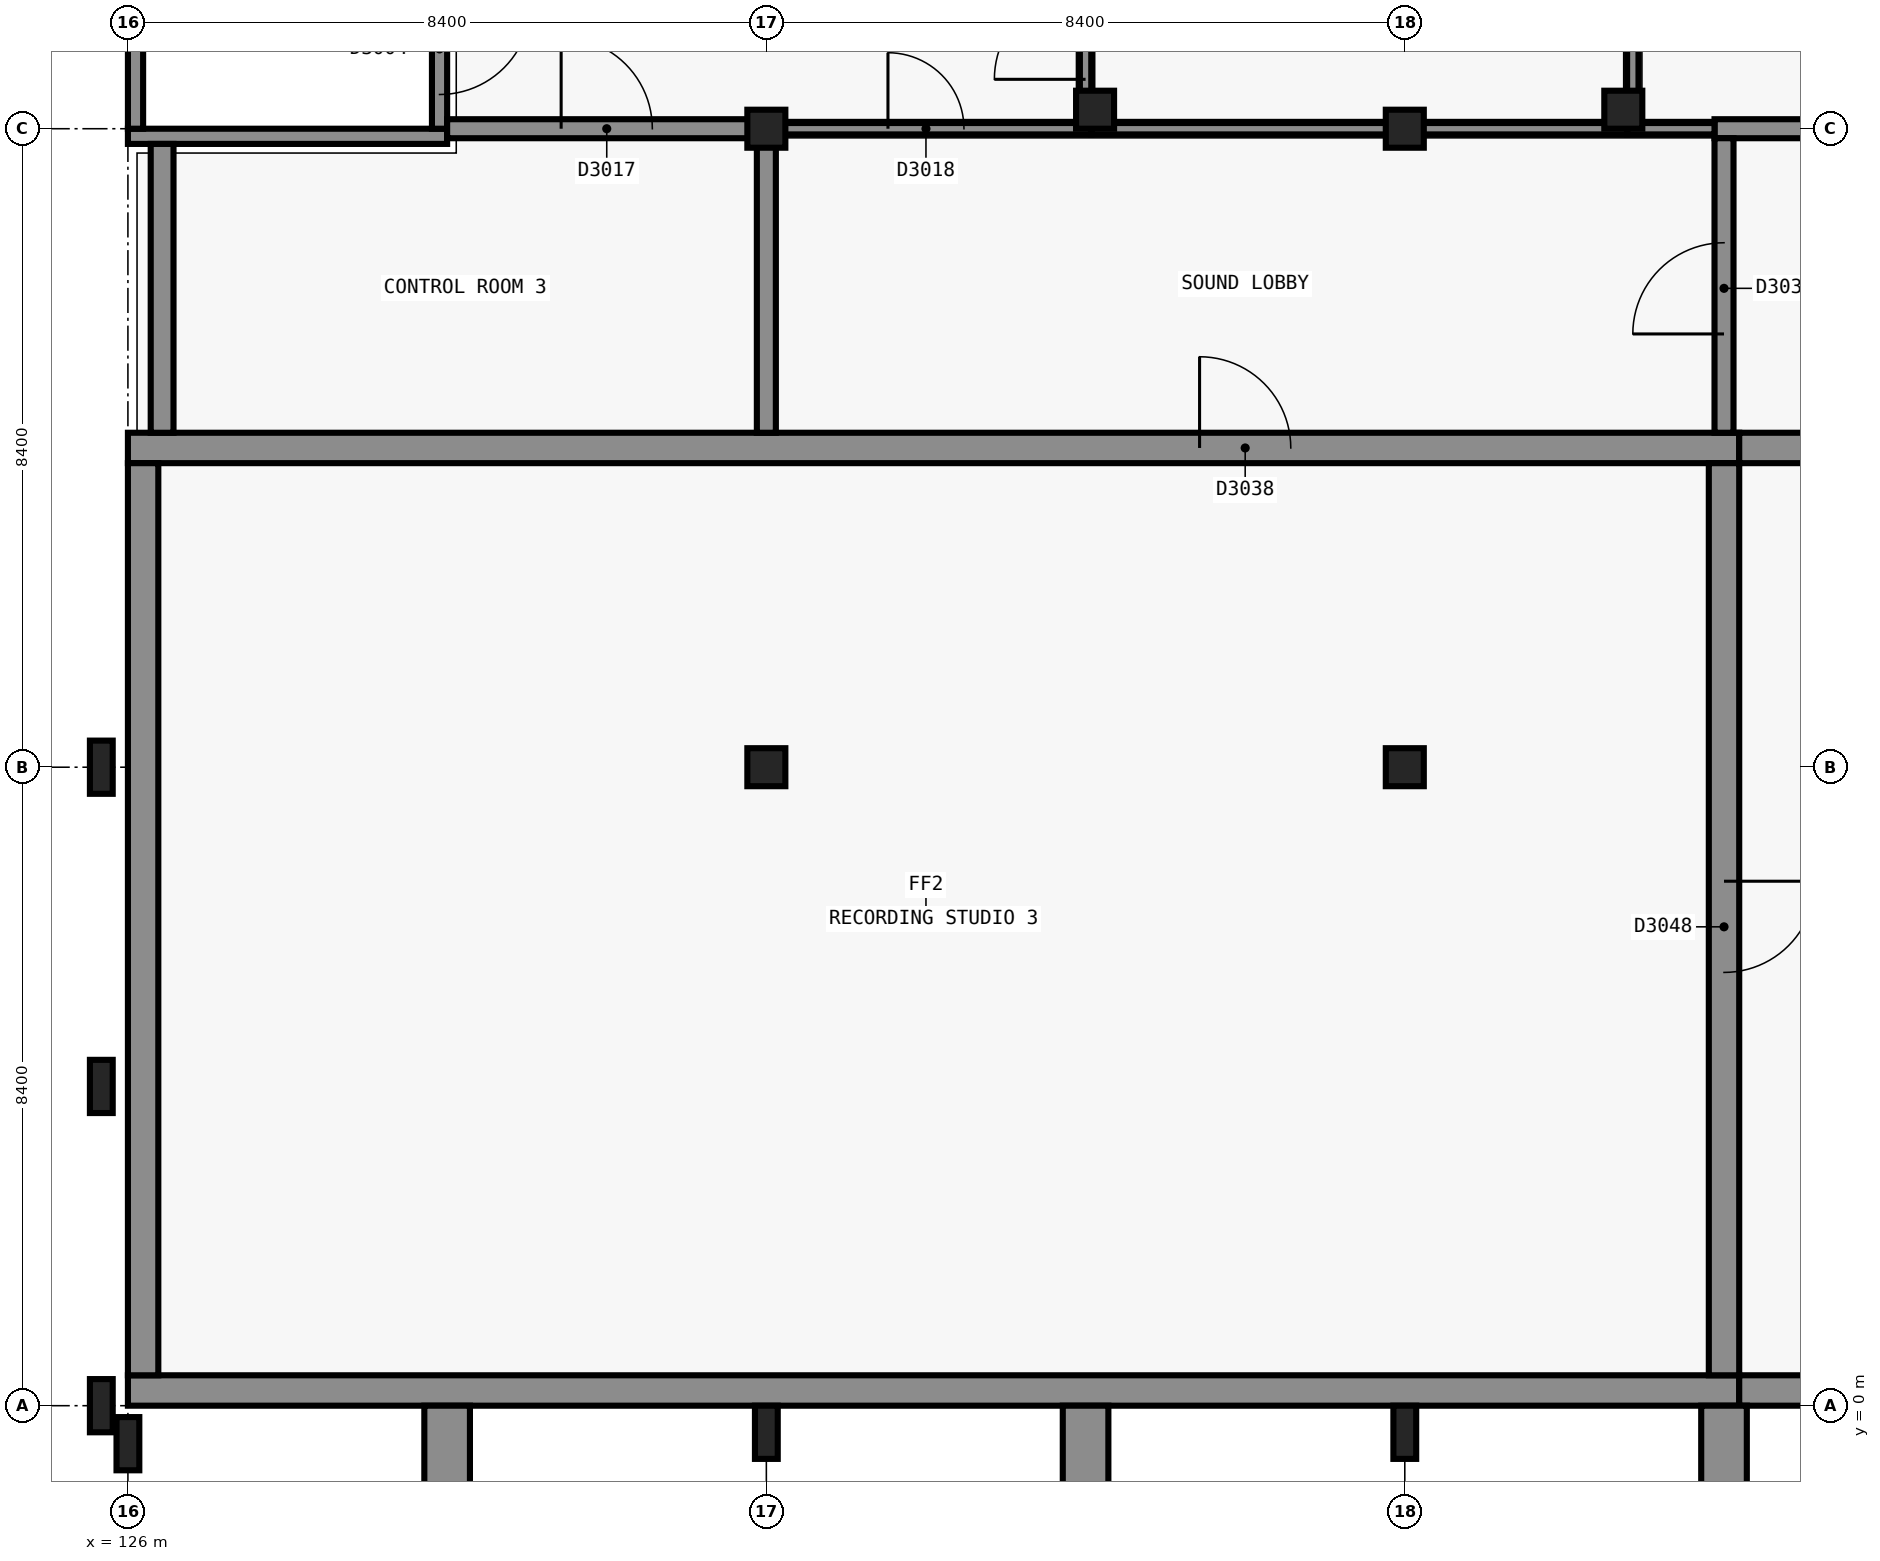
"""IFC4 building model, lengths in metres.
Left out: names, types, materials, properties, quantities, classifications, styles, units other than length and angle.
Written with IfcOpenShell. Run it as: python <this file> out.ifc"""

import sys

from ifc_helpers import new_model, si_unit, direction, frame, frame_2d, origin, origin_2d, place, context, subcontext, project, spatial, rectangle, extrude, element, fill, save


model = new_model("IFC4")
c1 = context("Model", 3, precision=1e-05, world=origin(), true_north=direction((0.0, 1.0)))
c2 = subcontext(c1, "Body", "Model", "MODEL_VIEW")
j1 = project(units=[si_unit("LENGTHUNIT", "METRE"), si_unit("PLANEANGLEUNIT", "RADIAN")], contexts=[c1])
p1 = place(None, origin())
s1 = spatial("IfcSite", under=j1, at=p1, CompositionType="ELEMENT")
p2 = place(p1, origin())
s2 = spatial("IfcBuilding", under=s1, at=p2, CompositionType="ELEMENT")
p3 = place(p2, frame((0.0, 0.0, 15.0)))
s3 = spatial("IfcBuildingStorey", under=s2, at=p3, CompositionType="ELEMENT", Elevation=15.0)
p4 = place(p3, frame((130.2, 16.7, 0.0), z_axis=(0.0, 0.0, 1.0), x_axis=(-1.0, 0.0, 0.0)))
e1 = element("IfcWall", 1, at=p4, inside=s3, PredefinedType="SHEAR", context=c2, shape_type="SweptSolid", body=[
    extrude(rectangle(XDim=4.2, YDim=0.2, at=frame_2d((2.1, 0.0))), origin(), (0.0, 0.0, 1.0), 4.8),
])
p5 = place(p3, frame((126.1, 16.8, 0.0), z_axis=(0.0, 0.0, 1.0), x_axis=(0.0, 1.0, 0.0)))
e2 = element("IfcWall", 2, at=p5, inside=s3, PredefinedType="SHEAR", context=c2, shape_type="SweptSolid", body=[
    extrude(rectangle(XDim=8.2, YDim=0.2, at=frame_2d((4.1, 0.0))), origin(), (0.0, 0.0, 1.0), 4.8),
])
p6 = place(p3, frame((130.1, 25.0, 0.0), z_axis=(0.0, 0.0, 1.0), x_axis=(0.0, -1.0, 0.0)))
e3 = element("IfcWall", 3, at=p6, inside=s3, PredefinedType="SHEAR", context=c2, shape_type="SweptSolid", body=[
    extrude(rectangle(XDim=8.2, YDim=0.2, at=frame_2d((4.1, 0.0))), origin(), (0.0, 0.0, 1.0), 4.8),
])
p7 = place(p6, frame((6.55, 0.0, 0.0)))
e4 = element("IfcOpeningElement", 4, at=p7, cuts=e3, PredefinedType="OPENING", context=c2, shape_type="SweptSolid", body=[
    extrude(rectangle(XDim=1.2, YDim=2.1, at=frame_2d((0.6, 1.05))), frame((0.0, 0.11, 0.0), z_axis=(0.0, -1.0, 0.0), x_axis=(1.0, 0.0, 0.0)), (0.0, 0.0, 1.0), 0.22),
])
p8 = place(p3, frame((147.2, 0.2, 0.0), z_axis=(0.0, 0.0, 1.0), x_axis=(-1.0, 0.0, 0.0)))
e5 = element("IfcWall", 5, at=p8, inside=s3, PredefinedType="SHEAR", context=c2, shape_type="SweptSolid", body=[
    extrude(rectangle(XDim=21.2, YDim=0.4, at=frame_2d((10.6, 0.0))), origin(), (0.0, 0.0, 1.0), 4.8),
])
p9 = place(p3, frame((126.0, 12.6, 0.0), z_axis=(0.0, 0.0, 1.0), x_axis=(1.0, 0.0, 0.0)))
e6 = element("IfcWall", 6, at=p9, inside=s3, PredefinedType="SHEAR", context=c2, shape_type="SweptSolid", body=[
    extrude(rectangle(XDim=21.2, YDim=0.4, at=frame_2d((10.6, 0.0))), origin(), (0.0, 0.0, 1.0), 4.8),
])
p10 = place(p9, frame((14.1, 0.0, 0.0)))
e7 = element("IfcOpeningElement", 7, at=p10, cuts=e6, PredefinedType="OPENING", context=c2, shape_type="SweptSolid", body=[
    extrude(rectangle(XDim=1.2, YDim=2.1, at=frame_2d((0.6, 1.05))), frame((0.0, 0.21, 0.0), z_axis=(0.0, -1.0, 0.0), x_axis=(1.0, 0.0, 0.0)), (0.0, 0.0, 1.0), 0.42),
])
p11 = place(p3, frame((126.2, 0.4, 0.0), z_axis=(0.0, 0.0, 1.0), x_axis=(0.0, 1.0, 0.0)))
e8 = element("IfcWall", 8, at=p11, inside=s3, PredefinedType="SHEAR", context=c2, shape_type="SweptSolid", body=[
    extrude(rectangle(XDim=12.0, YDim=0.4, at=frame_2d((6.0, 0.0))), origin(), (0.0, 0.0, 1.0), 4.8),
])
p12 = place(p3, frame((147.0, 12.4, 0.0), z_axis=(0.0, 0.0, 1.0), x_axis=(0.0, -1.0, 0.0)))
e9 = element("IfcWall", 9, at=p12, inside=s3, PredefinedType="SHEAR", context=c2, shape_type="SweptSolid", body=[
    extrude(rectangle(XDim=12.0, YDim=0.4, at=frame_2d((6.0, 0.0))), origin(), (0.0, 0.0, 1.0), 4.8),
])
p13 = place(p12, frame((5.5, 0.0, 0.0)))
e10 = element("IfcOpeningElement", 10, at=p13, cuts=e9, PredefinedType="OPENING", context=c2, shape_type="SweptSolid", body=[
    extrude(rectangle(XDim=1.2, YDim=2.1, at=frame_2d((0.6, 1.05))), frame((0.0, 0.21, 0.0), z_axis=(0.0, -1.0, 0.0), x_axis=(1.0, 0.0, 0.0)), (0.0, 0.0, 1.0), 0.42),
])
for number, where, z_axis, x_axis in (
    (11, (168.0, 0.2, 0.0), (0.0, 0.0, 1.0), (-1.0, 0.0, 0.0)),
    (12, (147.2, 12.6, 0.0), (0.0, 0.0, 1.0), (1.0, 0.0, 0.0)),
):
    element("IfcWall", number, at=place(p3, frame(where, z_axis=z_axis, x_axis=x_axis)), inside=s3, PredefinedType="SHEAR", context=c2, shape_type="SweptSolid", body=[
        extrude(rectangle(XDim=20.8, YDim=0.4, at=frame_2d((10.4, 0.0))), origin(), (0.0, 0.0, 1.0), 4.8),
    ])
for number, where, z_axis, x_axis in (
    (13, (134.4, 8.4, 0.0), (0.0, 0.0, 1.0), (1.0, 0.0, 0.0)),
    (14, (134.4, 16.8, 0.0), (0.0, 0.0, 1.0), (1.0, 0.0, 0.0)),
    (15, (142.8, 8.4, 0.0), (0.0, 0.0, 1.0), (1.0, 0.0, 0.0)),
    (16, (142.8, 16.8, 0.0), (0.0, 0.0, 1.0), (1.0, 0.0, 0.0)),
    (17, (138.725, 17.05, 0.0), (0.0, 0.0, 1.0), (1.0, 0.0, 0.0)),
    (18, (145.675, 17.05, 0.0), (0.0, 0.0, 1.0), (1.0, 0.0, 0.0)),
):
    element("IfcColumn", number, at=place(p3, frame(where, z_axis=z_axis, x_axis=x_axis)), inside=s3, PredefinedType="COLUMN", context=c2, shape_type="SweptSolid", body=[
        extrude(rectangle(XDim=0.5, YDim=0.5, at=origin_2d()), origin(), (0.0, 0.0, 1.0), 4.8),
    ])
for number, where, z_axis, x_axis in (
    (19, (126.0, -0.5, 0.0), (0.0, 0.0, 1.0), (1.0, 0.0, 0.0)),
    (20, (134.4, -0.35, 0.0), (0.0, 0.0, 1.0), (1.0, 0.0, 0.0)),
    (21, (142.8, -0.35, 0.0), (0.0, 0.0, 1.0), (1.0, 0.0, 0.0)),
):
    element("IfcColumn", number, at=place(p3, frame(where, z_axis=z_axis, x_axis=x_axis)), inside=s3, PredefinedType="PILASTER", context=c2, shape_type="SweptSolid", body=[
        extrude(rectangle(XDim=0.3, YDim=0.7, at=origin_2d()), origin(), (0.0, 0.0, 1.0), 4.8),
    ])
p14 = place(p3, frame((126.45, 12.8, 0.0), z_axis=(0.0, 0.0, 1.0), x_axis=(0.0, 1.0, 0.0)))
e22 = element("IfcWall", 22, at=p14, inside=s3, PredefinedType="SOLIDWALL", context=c2, shape_type="SweptSolid", body=[
    extrude(rectangle(XDim=3.8, YDim=0.3, at=frame_2d((1.9, 0.0))), origin(), (0.0, 0.0, 1.0), 4.5),
])
for number, where, z_axis, x_axis in (
    (23, (125.65, 0.0, 0.0), (0.0, 0.0, 1.0), (0.0, 1.0, 0.0)),
    (24, (125.65, 4.2, 0.0), (0.0, 0.0, 1.0), (0.0, 1.0, 0.0)),
    (25, (125.65, 8.4, 0.0), (0.0, 0.0, 1.0), (0.0, 1.0, 0.0)),
):
    element("IfcColumn", number, at=place(p3, frame(where, z_axis=z_axis, x_axis=x_axis)), inside=s3, PredefinedType="PILASTER", context=c2, shape_type="SweptSolid", body=[
        extrude(rectangle(XDim=0.3, YDim=0.7, at=origin_2d()), origin(), (0.0, 0.0, 1.0), 4.8),
    ])
for number, where, z_axis, x_axis in (
    (26, (130.2, 0.0, 0.0), (0.0, 0.0, 1.0), (0.0, -1.0, 0.0)),
    (27, (138.6, 0.0, 0.0), (0.0, 0.0, 1.0), (0.0, -1.0, 0.0)),
    (28, (147.0, 0.0, 0.0), (0.0, 0.0, 1.0), (0.0, -1.0, 0.0)),
):
    element("IfcWall", number, at=place(p3, frame(where, z_axis=z_axis, x_axis=x_axis)), inside=s3, PredefinedType="SOLIDWALL", context=c2, shape_type="SweptSolid", body=[
        extrude(rectangle(XDim=1.5, YDim=0.6, at=frame_2d((0.75, 0.0))), origin(), (0.0, 0.0, 1.0), 4.8),
    ])
p15 = place(p3, frame((130.2, 16.8, 0.0), z_axis=(0.0, 0.0, 1.0), x_axis=(1.0, 0.0, 0.0)))
e29 = element("IfcWall", 29, at=p15, inside=s3, PredefinedType="PARTITIONING", context=c2, shape_type="SweptSolid", body=[
    extrude(rectangle(XDim=4.325, YDim=0.25, at=frame_2d((2.163, 0.0))), origin(), (0.0, 0.0, 1.0), 3.7),
])
p16 = place(p15, frame((1.5, 0.0, 0.0)))
e30 = element("IfcOpeningElement", 30, at=p16, cuts=e29, PredefinedType="OPENING", context=c2, shape_type="SweptSolid", body=[
    extrude(rectangle(XDim=1.2, YDim=2.1, at=frame_2d((0.6, 1.05))), frame((0.0, 0.135, 0.0), z_axis=(0.0, -1.0, 0.0), x_axis=(1.0, 0.0, 0.0)), (0.0, 0.0, 1.0), 0.27),
])
p17 = place(p3, frame((146.875, 16.8, 0.0), z_axis=(0.0, 0.0, 1.0), x_axis=(1.0, 0.0, 0.0)))
e31 = element("IfcWall", 31, at=p17, inside=s3, PredefinedType="PARTITIONING", context=c2, shape_type="SweptSolid", body=[
    extrude(rectangle(XDim=16.925, YDim=0.25, at=frame_2d((8.462, 0.0))), origin(), (0.0, 0.0, 1.0), 3.7),
])
p18 = place(p3, frame((134.4, 12.8, 0.0), z_axis=(0.0, 0.0, 1.0), x_axis=(0.0, 1.0, 0.0)))
e32 = element("IfcWall", 32, at=p18, inside=s3, PredefinedType="PARTITIONING", context=c2, shape_type="SweptSolid", body=[
    extrude(rectangle(XDim=3.875, YDim=0.25, at=frame_2d((1.938, 0.0))), origin(), (0.0, 0.0, 1.0), 3.7),
])
p19 = place(p3, frame((147.0, 12.8, 0.0), z_axis=(0.0, 0.0, 1.0), x_axis=(0.0, 1.0, 0.0)))
e33 = element("IfcWall", 33, at=p19, inside=s3, PredefinedType="PARTITIONING", context=c2, shape_type="SweptSolid", body=[
    extrude(rectangle(XDim=3.875, YDim=0.25, at=frame_2d((1.938, 0.0))), origin(), (0.0, 0.0, 1.0), 3.7),
])
p20 = place(p19, frame((1.3, 0.0, 0.0)))
e34 = element("IfcOpeningElement", 34, at=p20, cuts=e33, PredefinedType="OPENING", context=c2, shape_type="SweptSolid", body=[
    extrude(rectangle(XDim=1.2, YDim=2.1, at=frame_2d((0.6, 1.05))), frame((0.0, 0.135, 0.0), z_axis=(0.0, -1.0, 0.0), x_axis=(1.0, 0.0, 0.0)), (0.0, 0.0, 1.0), 0.27),
])
p21 = place(p3, frame((134.525, 16.8, 0.0), z_axis=(0.0, 0.0, 1.0), x_axis=(1.0, 0.0, 0.0)))
e35 = element("IfcWall", 35, at=p21, inside=s3, PredefinedType="PARTITIONING", context=c2, shape_type="SweptSolid", body=[
    extrude(rectangle(XDim=4.15, YDim=0.15, at=frame_2d((2.075, 0.0))), origin(), (0.0, 0.0, 1.0), 3.7),
])
p22 = place(p21, frame((1.475, 0.0, 0.0)))
e36 = element("IfcOpeningElement", 36, at=p22, cuts=e35, PredefinedType="OPENING", context=c2, shape_type="SweptSolid", body=[
    extrude(rectangle(XDim=1.0, YDim=2.1, at=frame_2d((0.5, 1.05))), frame((0.0, 0.085, 0.0), z_axis=(0.0, -1.0, 0.0), x_axis=(1.0, 0.0, 0.0)), (0.0, 0.0, 1.0), 0.17),
])
p23 = place(p3, frame((145.725, 16.8, 0.0), z_axis=(0.0, 0.0, 1.0), x_axis=(1.0, 0.0, 0.0)))
e37 = element("IfcWall", 37, at=p23, inside=s3, PredefinedType="PARTITIONING", context=c2, shape_type="SweptSolid", body=[
    extrude(rectangle(XDim=1.15, YDim=0.15, at=frame_2d((0.575, 0.0))), origin(), (0.0, 0.0, 1.0), 3.7),
])
p24 = place(p3, frame((138.675, 16.8, 0.0), z_axis=(0.0, 0.0, 1.0), x_axis=(1.0, 0.0, 0.0)))
e38 = element("IfcWall", 38, at=p24, inside=s3, PredefinedType="SOLIDWALL", context=c2, shape_type="SweptSolid", body=[
    extrude(rectangle(XDim=7.05, YDim=0.15, at=frame_2d((3.525, 0.0))), origin(), (0.0, 0.0, 1.0), 3.7),
])
p25 = place(p3, frame((138.6, 16.875, 0.0), z_axis=(0.0, 0.0, 1.0), x_axis=(0.0, 1.0, 0.0)))
e39 = element("IfcWall", 39, at=p25, inside=s3, PredefinedType="SOLIDWALL", context=c2, shape_type="SweptSolid", body=[
    extrude(rectangle(XDim=2.25, YDim=0.15, at=frame_2d((1.125, 0.0))), origin(), (0.0, 0.0, 1.0), 3.7),
])
p26 = place(p25, frame((0.575, 0.0, 0.0)))
e40 = element("IfcOpeningElement", 40, at=p26, cuts=e39, PredefinedType="OPENING", context=c2, shape_type="SweptSolid", body=[
    extrude(rectangle(XDim=1.2, YDim=2.1, at=frame_2d((0.6, 1.05))), frame((0.0, 0.085, 0.0), z_axis=(0.0, -1.0, 0.0), x_axis=(1.0, 0.0, 0.0)), (0.0, 0.0, 1.0), 0.17),
])
p27 = place(p3, frame((145.8, 16.875, 0.0), z_axis=(0.0, 0.0, 1.0), x_axis=(0.0, 1.0, 0.0)))
e41 = element("IfcWall", 41, at=p27, inside=s3, PredefinedType="SOLIDWALL", context=c2, shape_type="SweptSolid", body=[
    extrude(rectangle(XDim=1.65, YDim=0.15, at=frame_2d((0.825, 0.0))), origin(), (0.0, 0.0, 1.0), 3.7),
])
p28 = place(p7, origin())
e42 = element("IfcDoor", 42, at=p28, inside=s3, OperationType="SINGLE_SWING_LEFT", PredefinedType="DOOR", context=c2, shape_type="SweptSolid", body=[
    extrude(rectangle(XDim=1.2, YDim=2.1, at=frame_2d((0.6, 1.05))), frame((0.0, 0.025, 0.0), z_axis=(0.0, -1.0, 0.0), x_axis=(1.0, 0.0, 0.0)), (0.0, 0.0, 1.0), 0.05),
])
fill(e4, e42)
p29 = place(p16, origin())
e43 = element("IfcDoor", 43, at=p29, inside=s3, OperationType="SINGLE_SWING_RIGHT", PredefinedType="DOOR", context=c2, shape_type="SweptSolid", body=[
    extrude(rectangle(XDim=1.2, YDim=2.1, at=frame_2d((0.6, 1.05))), frame((0.0, 0.025, 0.0), z_axis=(0.0, -1.0, 0.0), x_axis=(1.0, 0.0, 0.0)), (0.0, 0.0, 1.0), 0.05),
])
fill(e30, e43)
p30 = place(p22, origin())
e44 = element("IfcDoor", 44, at=p30, inside=s3, OperationType="SINGLE_SWING_RIGHT", PredefinedType="DOOR", context=c2, shape_type="SweptSolid", body=[
    extrude(rectangle(XDim=1.0, YDim=2.1, at=frame_2d((0.5, 1.05))), frame((0.0, 0.025, 0.0), z_axis=(0.0, -1.0, 0.0), x_axis=(1.0, 0.0, 0.0)), (0.0, 0.0, 1.0), 0.05),
])
fill(e36, e44)
p31 = place(p26, origin())
e45 = element("IfcDoor", 45, at=p31, inside=s3, OperationType="SINGLE_SWING_RIGHT", PredefinedType="DOOR", context=c2, shape_type="SweptSolid", body=[
    extrude(rectangle(XDim=1.2, YDim=2.1, at=frame_2d((0.6, 1.05))), frame((0.0, 0.025, 0.0), z_axis=(0.0, -1.0, 0.0), x_axis=(1.0, 0.0, 0.0)), (0.0, 0.0, 1.0), 0.05),
])
fill(e40, e45)
p32 = place(p10, origin())
e46 = element("IfcDoor", 46, at=p32, inside=s3, OperationType="SINGLE_SWING_LEFT", PredefinedType="DOOR", context=c2, shape_type="SweptSolid", body=[
    extrude(rectangle(XDim=1.2, YDim=2.1, at=frame_2d((0.6, 1.05))), frame((0.0, 0.025, 0.0), z_axis=(0.0, -1.0, 0.0), x_axis=(1.0, 0.0, 0.0)), (0.0, 0.0, 1.0), 0.05),
])
fill(e7, e46)
p33 = place(p20, origin())
e47 = element("IfcDoor", 47, at=p33, inside=s3, OperationType="SINGLE_SWING_LEFT", PredefinedType="DOOR", context=c2, shape_type="SweptSolid", body=[
    extrude(rectangle(XDim=1.2, YDim=2.1, at=frame_2d((0.6, 1.05))), frame((0.0, 0.025, 0.0), z_axis=(0.0, -1.0, 0.0), x_axis=(1.0, 0.0, 0.0)), (0.0, 0.0, 1.0), 0.05),
])
fill(e34, e47)
p34 = place(p13, origin())
e48 = element("IfcDoor", 48, at=p34, inside=s3, OperationType="SINGLE_SWING_RIGHT", PredefinedType="DOOR", context=c2, shape_type="SweptSolid", body=[
    extrude(rectangle(XDim=1.2, YDim=2.1, at=frame_2d((0.6, 1.05))), frame((0.0, 0.025, 0.0), z_axis=(0.0, -1.0, 0.0), x_axis=(1.0, 0.0, 0.0)), (0.0, 0.0, 1.0), 0.05),
])
fill(e10, e48)
save(model, sys.argv[1])
